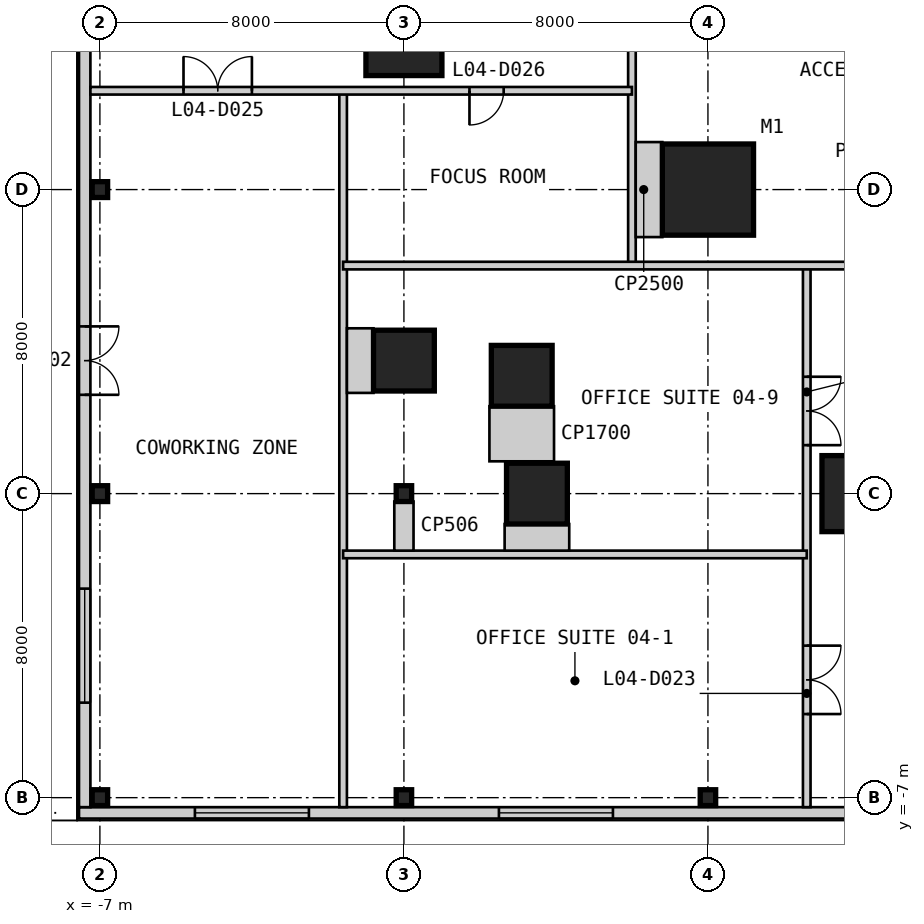
"""IFC4 building model, lengths in metres.
Left out: names, types, materials, properties, quantities, classifications, styles, units other than length and angle.
Written with IfcOpenShell. Run it as: python <this file> out.ifc"""

import sys

from ifc_helpers import new_model, si_unit, direction, frame, frame_2d, origin, origin_2d, place, context, subcontext, project, spatial, rectangle, i_section, extrude, element, fill, save


model = new_model("IFC4")
c1 = context("Model", 3, precision=1e-05, world=origin(), true_north=direction((0.0, 1.0)))
c2 = subcontext(c1, "Body", "Model", "MODEL_VIEW")
j1 = project(units=[si_unit("LENGTHUNIT", "METRE"), si_unit("PLANEANGLEUNIT", "RADIAN")], contexts=[c1])
p1 = place(None, origin())
s1 = spatial("IfcSite", under=j1, at=p1, CompositionType="ELEMENT")
p2 = place(p1, origin())
s2 = spatial("IfcBuilding", under=s1, at=p2, CompositionType="ELEMENT")
p3 = place(p2, frame((0.0, 0.0, 21.4)))
s3 = spatial("IfcBuildingStorey", under=s2, at=p3, CompositionType="ELEMENT", Elevation=21.4)
p4 = place(p3, frame((9.0, 9.0, 0.0), z_axis=(0.0, 0.0, 1.0), x_axis=(1.0, 0.0, 0.0)))
e1 = element("IfcColumn", 1, at=p4, inside=s3, PredefinedType="COLUMN", context=c2, shape_type="SweptSolid", body=[
    extrude(rectangle(XDim=2.4, YDim=2.4, at=origin_2d()), origin(), (0.0, 0.0, 1.0), 4.8),
])
p5 = place(p3, frame((4.5, 1.0, 0.0), z_axis=(0.0, 0.0, 1.0), x_axis=(1.0, 0.0, 0.0)))
e2 = element("IfcColumn", 2, at=p5, inside=s3, PredefinedType="COLUMN", context=c2, shape_type="SweptSolid", body=[
    extrude(rectangle(XDim=1.6, YDim=1.6, at=origin_2d()), origin(), (0.0, 0.0, 1.0), 4.8),
])
for number, where, z_axis, x_axis in (
    (3, (13.0, 1.0, 0.0), (0.0, 0.0, 1.0), (1.0, 0.0, 0.0)),
    (4, (1.0, 13.0, 0.0), (0.0, 0.0, 1.0), (1.0, 0.0, 0.0)),
):
    element("IfcColumn", number, at=place(p3, frame(where, z_axis=z_axis, x_axis=x_axis)), inside=s3, PredefinedType="COLUMN", context=c2, shape_type="SweptSolid", body=[
        extrude(rectangle(XDim=2.0, YDim=2.0, at=origin_2d()), origin(), (0.0, 0.0, 1.0), 4.8),
    ])
for number, where, z_axis, x_axis in (
    (5, (1.0, 4.5, 0.0), (0.0, 0.0, 1.0), (1.0, 0.0, 0.0)),
    (6, (4.1, 4.1, 0.0), (0.0, 0.0, 1.0), (1.0, 0.0, 0.0)),
):
    element("IfcColumn", number, at=place(p3, frame(where, z_axis=z_axis, x_axis=x_axis)), inside=s3, PredefinedType="COLUMN", context=c2, shape_type="SweptSolid", body=[
        extrude(rectangle(XDim=1.6, YDim=1.6, at=origin_2d()), origin(), (0.0, 0.0, 1.0), 4.8),
    ])
for number, where, z_axis, x_axis in (
    (7, (-7.0, -7.0, 0.0), (0.0, 0.0, 1.0), (1.0, 0.0, 0.0)),
    (8, (-7.0, 1.0, 0.0), (0.0, 0.0, 1.0), (1.0, 0.0, 0.0)),
    (9, (-7.0, 9.0, 0.0), (0.0, 0.0, 1.0), (1.0, 0.0, 0.0)),
    (10, (1.0, -7.0, 0.0), (0.0, 0.0, 1.0), (1.0, 0.0, 0.0)),
    (11, (1.0, 1.0, 0.0), (0.0, 0.0, 1.0), (1.0, 0.0, 0.0)),
    (12, (9.0, -7.0, 0.0), (0.0, 0.0, 1.0), (1.0, 0.0, 0.0)),
):
    element("IfcColumn", number, at=place(p3, frame(where, z_axis=z_axis, x_axis=x_axis)), inside=s3, PredefinedType="COLUMN", context=c2, shape_type="SweptSolid", body=[
        extrude(i_section(OverallWidth=0.406, OverallDepth=0.417, WebThickness=0.03, FlangeThickness=0.048, at=origin_2d()), origin(), (0.0, 0.0, 1.0), 4.8),
    ])
p6 = place(p3, frame((-7.55, -7.4, 0.0), z_axis=(0.0, 0.0, 1.0), x_axis=(1.0, 0.0, 0.0)))
e13 = element("IfcWall", 13, at=p6, inside=s3, PredefinedType="SOLIDWALL", context=c2, shape_type="SweptSolid", body=[
    extrude(rectangle(XDim=65.1, YDim=0.3, at=frame_2d((32.55, 0.0))), origin(), (0.0, 0.0, 1.0), 4.5),
])
p7 = place(p6, frame((3.05, 0.0, 0.9)))
e14 = element("IfcOpeningElement", 14, at=p7, cuts=e13, PredefinedType="OPENING", context=c2, shape_type="SweptSolid", body=[
    extrude(rectangle(XDim=3.0, YDim=2.4, at=frame_2d((1.5, 1.2))), frame((0.0, 0.16, 0.0), z_axis=(0.0, -1.0, 0.0), x_axis=(1.0, 0.0, 0.0)), (0.0, 0.0, 1.0), 0.32),
])
p8 = place(p6, frame((11.05, 0.0, 0.9)))
e15 = element("IfcOpeningElement", 15, at=p8, cuts=e13, PredefinedType="OPENING", context=c2, shape_type="SweptSolid", body=[
    extrude(rectangle(XDim=3.0, YDim=2.4, at=frame_2d((1.5, 1.2))), frame((0.0, 0.16, 0.0), z_axis=(0.0, -1.0, 0.0), x_axis=(1.0, 0.0, 0.0)), (0.0, 0.0, 1.0), 0.32),
])
p9 = place(p6, frame((25.05, 0.0, 0.9)))
e16 = element("IfcOpeningElement", 16, at=p9, cuts=e13, PredefinedType="OPENING", context=c2, shape_type="SweptSolid", body=[
    extrude(rectangle(XDim=3.0, YDim=2.4, at=frame_2d((1.5, 1.2))), frame((0.0, 0.16, 0.0), z_axis=(0.0, -1.0, 0.0), x_axis=(1.0, 0.0, 0.0)), (0.0, 0.0, 1.0), 0.32),
])
p10 = place(p6, frame((37.05, 0.0, 0.9)))
e17 = element("IfcOpeningElement", 17, at=p10, cuts=e13, PredefinedType="OPENING", context=c2, shape_type="SweptSolid", body=[
    extrude(rectangle(XDim=3.0, YDim=2.4, at=frame_2d((1.5, 1.2))), frame((0.0, 0.16, 0.0), z_axis=(0.0, -1.0, 0.0), x_axis=(1.0, 0.0, 0.0)), (0.0, 0.0, 1.0), 0.32),
])
p11 = place(p6, frame((45.55, 0.0, 0.9)))
e18 = element("IfcOpeningElement", 18, at=p11, cuts=e13, PredefinedType="OPENING", context=c2, shape_type="SweptSolid", body=[
    extrude(rectangle(XDim=3.0, YDim=2.4, at=frame_2d((1.5, 1.2))), frame((0.0, 0.16, 0.0), z_axis=(0.0, -1.0, 0.0), x_axis=(1.0, 0.0, 0.0)), (0.0, 0.0, 1.0), 0.32),
])
p12 = place(p6, frame((51.55, 0.0, 0.9)))
e19 = element("IfcOpeningElement", 19, at=p12, cuts=e13, PredefinedType="OPENING", context=c2, shape_type="SweptSolid", body=[
    extrude(rectangle(XDim=3.0, YDim=2.4, at=frame_2d((1.5, 1.2))), frame((0.0, 0.16, 0.0), z_axis=(0.0, -1.0, 0.0), x_axis=(1.0, 0.0, 0.0)), (0.0, 0.0, 1.0), 0.32),
])
p13 = place(p6, frame((59.05, 0.0, 0.9)))
e20 = element("IfcOpeningElement", 20, at=p13, cuts=e13, PredefinedType="OPENING", context=c2, shape_type="SweptSolid", body=[
    extrude(rectangle(XDim=3.0, YDim=2.4, at=frame_2d((1.5, 1.2))), frame((0.0, 0.16, 0.0), z_axis=(0.0, -1.0, 0.0), x_axis=(1.0, 0.0, 0.0)), (0.0, 0.0, 1.0), 0.32),
])
p14 = place(p3, frame((-7.4, 65.25, 0.0), z_axis=(0.0, 0.0, 1.0), x_axis=(0.0, -1.0, 0.0)))
e21 = element("IfcWall", 21, at=p14, inside=s3, PredefinedType="SOLIDWALL", context=c2, shape_type="SweptSolid", body=[
    extrude(rectangle(XDim=72.5, YDim=0.3, at=frame_2d((36.25, 0.0))), origin(), (0.0, 0.0, 1.0), 4.5),
])
p15 = place(p14, frame((24.85, 0.0, 0.0)))
e22 = element("IfcOpeningElement", 22, at=p15, cuts=e21, PredefinedType="OPENING", context=c2, shape_type="SweptSolid", body=[
    extrude(rectangle(XDim=1.8, YDim=2.4, at=frame_2d((0.9, 1.2))), frame((0.0, 0.16, 0.0), z_axis=(0.0, -1.0, 0.0), x_axis=(1.0, 0.0, 0.0)), (0.0, 0.0, 1.0), 0.32),
])
p16 = place(p14, frame((59.85, 0.0, 0.0)))
e23 = element("IfcOpeningElement", 23, at=p16, cuts=e21, PredefinedType="OPENING", context=c2, shape_type="SweptSolid", body=[
    extrude(rectangle(XDim=1.8, YDim=2.4, at=frame_2d((0.9, 1.2))), frame((0.0, 0.16, 0.0), z_axis=(0.0, -1.0, 0.0), x_axis=(1.0, 0.0, 0.0)), (0.0, 0.0, 1.0), 0.32),
])
p17 = place(p14, frame((66.75, 0.0, 0.9)))
e24 = element("IfcOpeningElement", 24, at=p17, cuts=e21, PredefinedType="OPENING", context=c2, shape_type="SweptSolid", body=[
    extrude(rectangle(XDim=3.0, YDim=2.4, at=frame_2d((1.5, 1.2))), frame((0.0, 0.16, 0.0), z_axis=(0.0, -1.0, 0.0), x_axis=(1.0, 0.0, 0.0)), (0.0, 0.0, 1.0), 0.32),
])
p18 = place(p14, frame((44.75, 0.0, 0.9)))
e25 = element("IfcOpeningElement", 25, at=p18, cuts=e21, PredefinedType="OPENING", context=c2, shape_type="SweptSolid", body=[
    extrude(rectangle(XDim=3.0, YDim=2.4, at=frame_2d((1.5, 1.2))), frame((0.0, 0.16, 0.0), z_axis=(0.0, -1.0, 0.0), x_axis=(1.0, 0.0, 0.0)), (0.0, 0.0, 1.0), 0.32),
])
p19 = place(p14, frame((32.75, 0.0, 0.9)))
e26 = element("IfcOpeningElement", 26, at=p19, cuts=e21, PredefinedType="OPENING", context=c2, shape_type="SweptSolid", body=[
    extrude(rectangle(XDim=3.0, YDim=2.4, at=frame_2d((1.5, 1.2))), frame((0.0, 0.16, 0.0), z_axis=(0.0, -1.0, 0.0), x_axis=(1.0, 0.0, 0.0)), (0.0, 0.0, 1.0), 0.32),
])
p20 = place(p14, frame((18.25, 0.0, 0.9)))
e27 = element("IfcOpeningElement", 27, at=p20, cuts=e21, PredefinedType="OPENING", context=c2, shape_type="SweptSolid", body=[
    extrude(rectangle(XDim=3.0, YDim=2.4, at=frame_2d((1.5, 1.2))), frame((0.0, 0.16, 0.0), z_axis=(0.0, -1.0, 0.0), x_axis=(1.0, 0.0, 0.0)), (0.0, 0.0, 1.0), 0.32),
])
p21 = place(p14, frame((10.75, 0.0, 0.9)))
e28 = element("IfcOpeningElement", 28, at=p21, cuts=e21, PredefinedType="OPENING", context=c2, shape_type="SweptSolid", body=[
    extrude(rectangle(XDim=3.0, YDim=2.4, at=frame_2d((1.5, 1.2))), frame((0.0, 0.16, 0.0), z_axis=(0.0, -1.0, 0.0), x_axis=(1.0, 0.0, 0.0)), (0.0, 0.0, 1.0), 0.32),
])
p22 = place(p14, frame((2.75, 0.0, 0.9)))
e29 = element("IfcOpeningElement", 29, at=p22, cuts=e21, PredefinedType="OPENING", context=c2, shape_type="SweptSolid", body=[
    extrude(rectangle(XDim=3.0, YDim=2.4, at=frame_2d((1.5, 1.2))), frame((0.0, 0.16, 0.0), z_axis=(0.0, -1.0, 0.0), x_axis=(1.0, 0.0, 0.0)), (0.0, 0.0, 1.0), 0.32),
])
p23 = place(p3, frame((-0.6, -7.25, 0.0), z_axis=(0.0, 0.0, 1.0), x_axis=(0.0, 1.0, 0.0)))
e30 = element("IfcWall", 30, at=p23, inside=s3, PredefinedType="PARTITIONING", context=c2, shape_type="SweptSolid", body=[
    extrude(rectangle(XDim=18.85, YDim=0.2, at=frame_2d((9.425, 0.0))), origin(), (0.0, 0.0, 1.0), 4.5),
])
p24 = place(p3, frame((7.0, 7.0, 0.0), z_axis=(0.0, 0.0, 1.0), x_axis=(0.0, 1.0, 0.0)))
e31 = element("IfcWall", 31, at=p24, inside=s3, PredefinedType="PARTITIONING", context=c2, shape_type="SweptSolid", body=[
    extrude(rectangle(XDim=6.0, YDim=0.2, at=frame_2d((3.0, 0.0))), origin(), (0.0, 0.0, 1.0), 4.5),
])
p25 = place(p3, frame((11.6, -7.25, 0.0), z_axis=(0.0, 0.0, 1.0), x_axis=(0.0, 1.0, 0.0)))
e32 = element("IfcWall", 32, at=p25, inside=s3, PredefinedType="PARTITIONING", context=c2, shape_type="SweptSolid", body=[
    extrude(rectangle(XDim=14.25, YDim=0.2, at=frame_2d((7.125, 0.0))), origin(), (0.0, 0.0, 1.0), 4.5),
])
p26 = place(p25, frame((2.45, 0.0, 0.0)))
e33 = element("IfcOpeningElement", 33, at=p26, cuts=e32, PredefinedType="OPENING", context=c2, shape_type="SweptSolid", body=[
    extrude(rectangle(XDim=1.8, YDim=2.4, at=frame_2d((0.9, 1.2))), frame((0.0, 0.11, 0.0), z_axis=(0.0, -1.0, 0.0), x_axis=(1.0, 0.0, 0.0)), (0.0, 0.0, 1.0), 0.22),
])
p27 = place(p25, frame((9.525, 0.0, 0.0)))
e34 = element("IfcOpeningElement", 34, at=p27, cuts=e32, PredefinedType="OPENING", context=c2, shape_type="SweptSolid", body=[
    extrude(rectangle(XDim=1.8, YDim=2.4, at=frame_2d((0.9, 1.2))), frame((0.0, 0.11, 0.0), z_axis=(0.0, -1.0, 0.0), x_axis=(1.0, 0.0, 0.0)), (0.0, 0.0, 1.0), 0.22),
])
p28 = place(p3, frame((-0.6, -0.6, 0.0), z_axis=(0.0, 0.0, 1.0), x_axis=(1.0, 0.0, 0.0)))
e35 = element("IfcWall", 35, at=p28, inside=s3, PredefinedType="PARTITIONING", context=c2, shape_type="SweptSolid", body=[
    extrude(rectangle(XDim=12.2, YDim=0.2, at=frame_2d((6.1, 0.0))), origin(), (0.0, 0.0, 1.0), 4.5),
])
p29 = place(p3, frame((-0.6, 7.0, 0.0), z_axis=(0.0, 0.0, 1.0), x_axis=(1.0, 0.0, 0.0)))
e36 = element("IfcWall", 36, at=p29, inside=s3, PredefinedType="PARTITIONING", context=c2, shape_type="SweptSolid", body=[
    extrude(rectangle(XDim=23.8, YDim=0.2, at=frame_2d((11.9, 0.0))), origin(), (0.0, 0.0, 1.0), 4.5),
])
p30 = place(p29, frame((14.15, 0.0, 0.0)))
e37 = element("IfcOpeningElement", 37, at=p30, cuts=e36, PredefinedType="OPENING", context=c2, shape_type="SweptSolid", body=[
    extrude(rectangle(XDim=0.9, YDim=2.2, at=frame_2d((0.45, 1.1))), frame((0.0, 0.11, 0.0), z_axis=(0.0, -1.0, 0.0), x_axis=(1.0, 0.0, 0.0)), (0.0, 0.0, 1.0), 0.22),
])
p31 = place(p3, frame((-7.25, 11.6, 0.0), z_axis=(0.0, 0.0, 1.0), x_axis=(1.0, 0.0, 0.0)))
e38 = element("IfcWall", 38, at=p31, inside=s3, PredefinedType="PARTITIONING", context=c2, shape_type="SweptSolid", body=[
    extrude(rectangle(XDim=14.25, YDim=0.2, at=frame_2d((7.125, 0.0))), origin(), (0.0, 0.0, 1.0), 4.5),
])
p32 = place(p31, frame((2.45, 0.0, 0.0)))
e39 = element("IfcOpeningElement", 39, at=p32, cuts=e38, PredefinedType="OPENING", context=c2, shape_type="SweptSolid", body=[
    extrude(rectangle(XDim=1.8, YDim=2.4, at=frame_2d((0.9, 1.2))), frame((0.0, 0.11, 0.0), z_axis=(0.0, -1.0, 0.0), x_axis=(1.0, 0.0, 0.0)), (0.0, 0.0, 1.0), 0.22),
])
p33 = place(p31, frame((9.975, 0.0, 0.0)))
e40 = element("IfcOpeningElement", 40, at=p33, cuts=e38, PredefinedType="OPENING", context=c2, shape_type="SweptSolid", body=[
    extrude(rectangle(XDim=0.9, YDim=2.2, at=frame_2d((0.45, 1.1))), frame((0.0, 0.11, 0.0), z_axis=(0.0, -1.0, 0.0), x_axis=(1.0, 0.0, 0.0)), (0.0, 0.0, 1.0), 0.22),
])
for number, where, z_axis, x_axis in (
    (41, (4.5, -0.5, 0.0), (0.0, 0.0, 1.0), (0.0, 1.0, 0.0)),
    (42, (-0.5, 4.5, 0.0), (0.0, 0.0, 1.0), (1.0, 0.0, 0.0)),
):
    element("IfcWall", number, at=place(p3, frame(where, z_axis=z_axis, x_axis=x_axis)), inside=s3, PredefinedType="PARTITIONING", context=c2, shape_type="SweptSolid", body=[
        extrude(rectangle(XDim=0.7, YDim=1.7, at=frame_2d((0.35, 0.0))), origin(), (0.0, 0.0, 1.0), 4.5),
    ])
p34 = place(p3, frame((4.1, 1.85, 0.0), z_axis=(0.0, 0.0, 1.0), x_axis=(0.0, 1.0, 0.0)))
e43 = element("IfcWall", 43, at=p34, inside=s3, PredefinedType="PARTITIONING", context=c2, shape_type="SweptSolid", body=[
    extrude(rectangle(XDim=1.45, YDim=1.7, at=frame_2d((0.725, 0.0))), origin(), (0.0, 0.0, 1.0), 4.5),
])
p35 = place(p3, frame((1.0, -0.5, 0.0), z_axis=(0.0, 0.0, 1.0), x_axis=(0.0, 1.0, 0.0)))
e44 = element("IfcWall", 44, at=p35, inside=s3, PredefinedType="PARTITIONING", context=c2, shape_type="SweptSolid", body=[
    extrude(rectangle(XDim=1.292, YDim=0.506, at=frame_2d((0.646, 0.0))), origin(), (0.0, 0.0, 1.0), 3.754),
])
p36 = place(p3, frame((7.1, 9.0, 0.0), z_axis=(0.0, 0.0, 1.0), x_axis=(1.0, 0.0, 0.0)))
e45 = element("IfcWall", 45, at=p36, inside=s3, PredefinedType="PARTITIONING", context=c2, shape_type="SweptSolid", body=[
    extrude(rectangle(XDim=0.7, YDim=2.5, at=frame_2d((0.35, 0.0))), origin(), (0.0, 0.0, 1.0), 4.5),
])
p37 = place(p7, origin())
e46 = element("IfcWindow", 46, at=p37, inside=s3, PartitioningType="SINGLE_PANEL", PredefinedType="WINDOW", context=c2, shape_type="SweptSolid", body=[
    extrude(rectangle(XDim=3.0, YDim=2.4, at=frame_2d((1.5, 1.2))), frame((0.0, 0.03, 0.0), z_axis=(0.0, -1.0, 0.0), x_axis=(1.0, 0.0, 0.0)), (0.0, 0.0, 1.0), 0.06),
])
fill(e14, e46)
p38 = place(p8, origin())
e47 = element("IfcWindow", 47, at=p38, inside=s3, PartitioningType="SINGLE_PANEL", PredefinedType="WINDOW", context=c2, shape_type="SweptSolid", body=[
    extrude(rectangle(XDim=3.0, YDim=2.4, at=frame_2d((1.5, 1.2))), frame((0.0, 0.03, 0.0), z_axis=(0.0, -1.0, 0.0), x_axis=(1.0, 0.0, 0.0)), (0.0, 0.0, 1.0), 0.06),
])
fill(e15, e47)
p39 = place(p16, origin())
e48 = element("IfcDoor", 48, at=p39, inside=s3, OperationType="DOUBLE_DOOR_SINGLE_SWING", PredefinedType="DOOR", context=c2, shape_type="SweptSolid", body=[
    extrude(rectangle(XDim=1.8, YDim=2.4, at=frame_2d((0.9, 1.2))), frame((0.0, 0.025, 0.0), z_axis=(0.0, -1.0, 0.0), x_axis=(1.0, 0.0, 0.0)), (0.0, 0.0, 1.0), 0.05),
])
fill(e23, e48)
p40 = place(p17, origin())
e49 = element("IfcWindow", 49, at=p40, inside=s3, PartitioningType="SINGLE_PANEL", PredefinedType="WINDOW", context=c2, shape_type="SweptSolid", body=[
    extrude(rectangle(XDim=3.0, YDim=2.4, at=frame_2d((1.5, 1.2))), frame((0.0, 0.03, 0.0), z_axis=(0.0, -1.0, 0.0), x_axis=(1.0, 0.0, 0.0)), (0.0, 0.0, 1.0), 0.06),
])
fill(e24, e49)
p41 = place(p26, frame((1.8, 0.0, 0.0), z_axis=(0.0, 0.0, 1.0), x_axis=(-1.0, 0.0, 0.0)))
e50 = element("IfcDoor", 50, at=p41, inside=s3, OperationType="DOUBLE_DOOR_SINGLE_SWING", PredefinedType="DOOR", context=c2, shape_type="SweptSolid", body=[
    extrude(rectangle(XDim=1.8, YDim=2.4, at=frame_2d((0.9, 1.2))), frame((0.0, 0.025, 0.0), z_axis=(0.0, -1.0, 0.0), x_axis=(1.0, 0.0, 0.0)), (0.0, 0.0, 1.0), 0.05),
])
fill(e33, e50)
p42 = place(p27, frame((1.8, 0.0, 0.0), z_axis=(0.0, 0.0, 1.0), x_axis=(-1.0, 0.0, 0.0)))
e51 = element("IfcDoor", 51, at=p42, inside=s3, OperationType="DOUBLE_DOOR_SINGLE_SWING", PredefinedType="DOOR", context=c2, shape_type="SweptSolid", body=[
    extrude(rectangle(XDim=1.8, YDim=2.4, at=frame_2d((0.9, 1.2))), frame((0.0, 0.025, 0.0), z_axis=(0.0, -1.0, 0.0), x_axis=(1.0, 0.0, 0.0)), (0.0, 0.0, 1.0), 0.05),
])
fill(e34, e51)
p43 = place(p32, origin())
e52 = element("IfcDoor", 52, at=p43, inside=s3, OperationType="DOUBLE_DOOR_SINGLE_SWING", PredefinedType="DOOR", context=c2, shape_type="SweptSolid", body=[
    extrude(rectangle(XDim=1.8, YDim=2.4, at=frame_2d((0.9, 1.2))), frame((0.0, 0.025, 0.0), z_axis=(0.0, -1.0, 0.0), x_axis=(1.0, 0.0, 0.0)), (0.0, 0.0, 1.0), 0.05),
])
fill(e39, e52)
p44 = place(p33, frame((0.9, 0.0, 0.0), z_axis=(0.0, 0.0, 1.0), x_axis=(-1.0, 0.0, 0.0)))
e53 = element("IfcDoor", 53, at=p44, inside=s3, OperationType="SINGLE_SWING_RIGHT", PredefinedType="DOOR", context=c2, shape_type="SweptSolid", body=[
    extrude(rectangle(XDim=0.9, YDim=2.2, at=frame_2d((0.45, 1.1))), frame((0.0, 0.025, 0.0), z_axis=(0.0, -1.0, 0.0), x_axis=(1.0, 0.0, 0.0)), (0.0, 0.0, 1.0), 0.05),
])
fill(e40, e53)
save(model, sys.argv[1])
